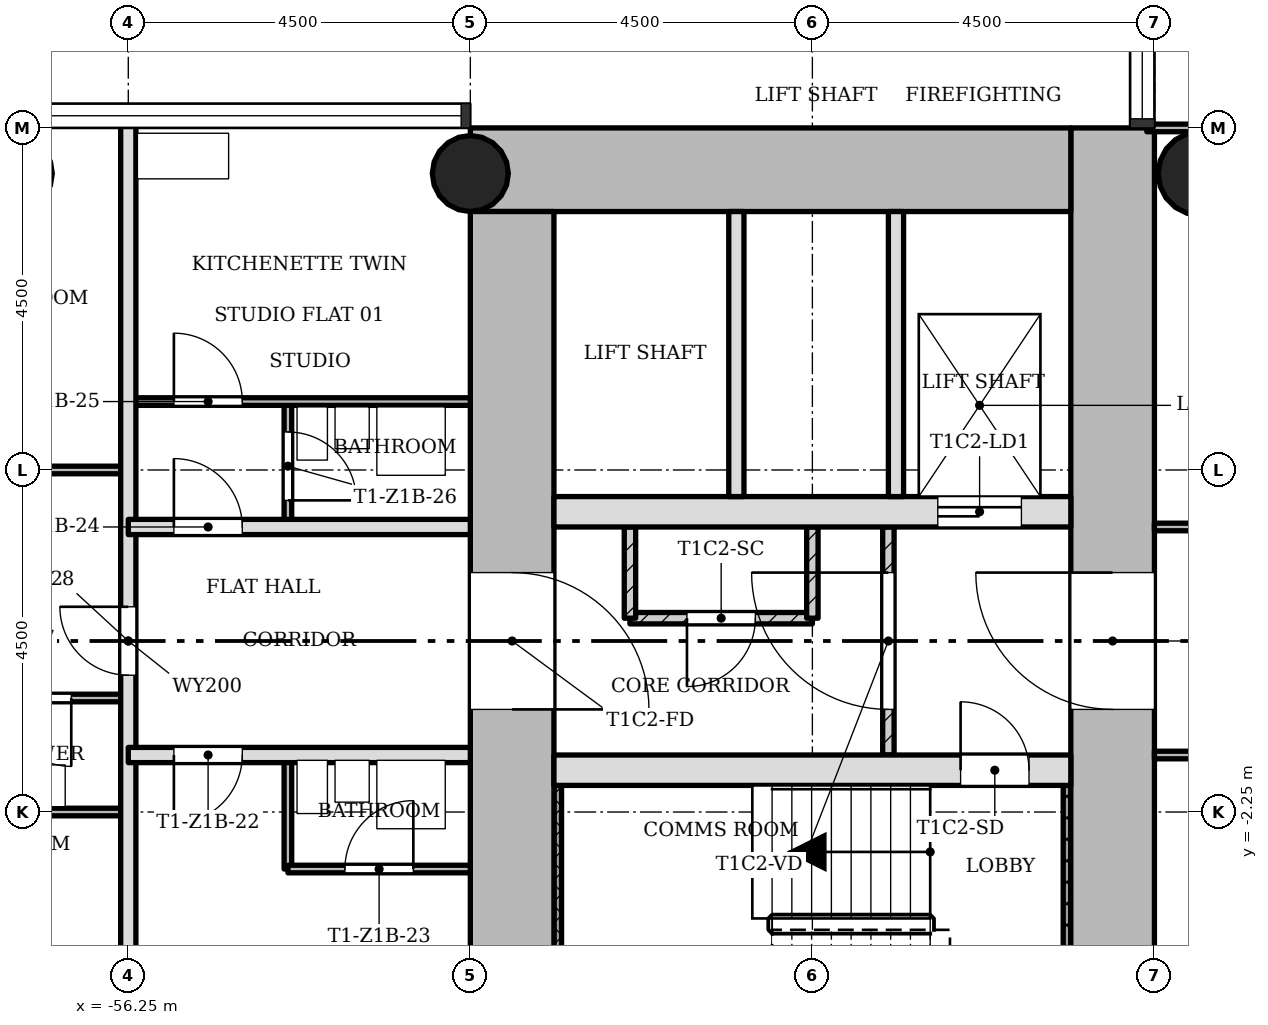
"""IFC4 building model, lengths in metres.
Left out: names, types, materials, properties, quantities, classifications, styles, units other than length and angle.
Written with IfcOpenShell. Run it as: python <this file> out.ifc"""

import sys

from ifc_helpers import new_model, si_unit, direction, frame, frame_2d, origin, origin_2d, place, context, subcontext, project, spatial, rectangle, hollow_circle, extrude, element, fill, save


model = new_model("IFC4")
c1 = context("Model", 3, precision=1e-05, world=origin(), true_north=direction((0.0, 1.0)))
c2 = subcontext(c1, "Body", "Model", "MODEL_VIEW")
j1 = project(units=[si_unit("LENGTHUNIT", "METRE"), si_unit("PLANEANGLEUNIT", "RADIAN")], contexts=[c1])
p1 = place(None, origin())
s1 = spatial("IfcSite", under=j1, at=p1, CompositionType="ELEMENT")
p2 = place(p1, origin())
s2 = spatial("IfcBuilding", under=s1, at=p2, CompositionType="ELEMENT")
p3 = place(p2, frame((0.0, 0.0, 41.5)))
s3 = spatial("IfcBuildingStorey", under=s2, at=p3, CompositionType="ELEMENT", Elevation=41.5)
p4 = place(p3, frame((-43.3, -5.65, 0.0), z_axis=(0.0, 0.0, 1.0), x_axis=(0.0, 1.0, 0.0)))
e1 = element("IfcWall", 1, at=p4, inside=s3, PredefinedType="SHEAR", context=c2, shape_type="SweptSolid", body=[
    extrude(rectangle(XDim=12.4, YDim=1.1, at=frame_2d((6.2, 0.0))), origin(), (0.0, 0.0, 1.0), 3.4),
])
p5 = place(p4, frame((4.75, 0.0, 0.0)))
e2 = element("IfcOpeningElement", 2, at=p5, cuts=e1, PredefinedType="OPENING", context=c2, shape_type="SweptSolid", body=[
    extrude(rectangle(XDim=1.8, YDim=2.1, at=frame_2d((0.9, 1.05))), frame((0.0, 0.56, 0.0), z_axis=(0.0, -1.0, 0.0), x_axis=(1.0, 0.0, 0.0)), (0.0, 0.0, 1.0), 1.12),
])
p6 = place(p3, frame((-43.85, 6.2, 0.0), z_axis=(0.0, 0.0, 1.0), x_axis=(-1.0, 0.0, 0.0)))
e3 = element("IfcWall", 3, at=p6, inside=s3, PredefinedType="SHEAR", context=c2, shape_type="SweptSolid", body=[
    extrude(rectangle(XDim=7.9, YDim=1.1, at=frame_2d((3.95, 0.0))), origin(), (0.0, 0.0, 1.0), 3.4),
])
p7 = place(p3, frame((-51.2, 5.65, 0.0), z_axis=(0.0, 0.0, 1.0), x_axis=(0.0, -1.0, 0.0)))
e4 = element("IfcWall", 4, at=p7, inside=s3, PredefinedType="SHEAR", context=c2, shape_type="SweptSolid", body=[
    extrude(rectangle(XDim=12.4, YDim=1.1, at=frame_2d((6.2, 0.0))), origin(), (0.0, 0.0, 1.0), 3.4),
])
p8 = place(p7, frame((4.75, 0.0, 0.0)))
e5 = element("IfcOpeningElement", 5, at=p8, cuts=e4, PredefinedType="OPENING", context=c2, shape_type="SweptSolid", body=[
    extrude(rectangle(XDim=1.8, YDim=2.1, at=frame_2d((0.9, 1.05))), frame((0.0, 0.56, 0.0), z_axis=(0.0, -1.0, 0.0), x_axis=(1.0, 0.0, 0.0)), (0.0, 0.0, 1.0), 1.12),
])
p9 = place(p3, frame((-50.65, -1.7, 0.0), z_axis=(0.0, 0.0, 1.0), x_axis=(1.0, 0.0, 0.0)))
e6 = element("IfcWall", 6, at=p9, inside=s3, PredefinedType="SHEAR", context=c2, shape_type="SweptSolid", body=[
    extrude(rectangle(XDim=6.8, YDim=0.4, at=frame_2d((3.4, 0.0))), origin(), (0.0, 0.0, 1.0), 3.4),
])
p10 = place(p9, frame((5.35, 0.0, 0.0)))
e7 = element("IfcOpeningElement", 7, at=p10, cuts=e6, PredefinedType="OPENING", context=c2, shape_type="SweptSolid", body=[
    extrude(rectangle(XDim=0.9, YDim=2.1, at=frame_2d((0.45, 1.05))), frame((0.0, 0.21, 0.0), z_axis=(0.0, -1.0, 0.0), x_axis=(1.0, 0.0, 0.0)), (0.0, 0.0, 1.0), 0.42),
])
p11 = place(p3, frame((-50.65, 1.7, 0.0), z_axis=(0.0, 0.0, 1.0), x_axis=(1.0, 0.0, 0.0)))
e8 = element("IfcWall", 8, at=p11, inside=s3, PredefinedType="SHEAR", context=c2, shape_type="SweptSolid", body=[
    extrude(rectangle(XDim=6.8, YDim=0.4, at=frame_2d((3.4, 0.0))), origin(), (0.0, 0.0, 1.0), 3.4),
])
p12 = place(p11, frame((5.05, 0.0, 0.0)))
e9 = element("IfcOpeningElement", 9, at=p12, cuts=e8, PredefinedType="OPENING", context=c2, shape_type="SweptSolid", body=[
    extrude(rectangle(XDim=1.1, YDim=2.1, at=frame_2d((0.55, 1.05))), frame((0.0, 0.21, 0.0), z_axis=(0.0, -1.0, 0.0), x_axis=(1.0, 0.0, 0.0)), (0.0, 0.0, 1.0), 0.42),
])
p13 = place(p3, frame((-51.75, 6.15, 0.0), z_axis=(0.0, 0.0, 1.0), x_axis=(1.0, 0.0, 0.0)))
e10 = element("IfcColumn", 10, at=p13, inside=s3, PredefinedType="COLUMN", context=c2, shape_type="SweptSolid", body=[
    extrude(hollow_circle(Radius=0.5, WallThickness=0.036, at=origin_2d()), origin(), (0.0, 0.0, 1.0), 3.4),
])
p14 = place(p3, frame((-42.15, 6.15, 0.0), z_axis=(0.0, 0.0, 1.0), x_axis=(1.0, 0.0, 0.0)))
e11 = element("IfcColumn", 11, at=p14, inside=s3, PredefinedType="COLUMN", context=c2, shape_type="SweptSolid", body=[
    extrude(hollow_circle(Radius=0.55, WallThickness=0.04, at=origin_2d()), origin(), (0.0, 0.0, 1.0), 3.4),
])
p15 = place(p3, frame((-46.25, 1.5, 0.0), z_axis=(0.0, 0.0, 1.0), x_axis=(0.0, -1.0, 0.0)))
e12 = element("IfcWall", 12, at=p15, inside=s3, PredefinedType="PARTITIONING", context=c2, shape_type="SweptSolid", body=[
    extrude(rectangle(XDim=3.0, YDim=0.15, at=frame_2d((1.5, 0.0))), origin(), (0.0, 0.0, 1.0), 3.0),
])
p16 = place(p15, frame((0.6, 0.0, 0.0)))
e13 = element("IfcOpeningElement", 13, at=p16, cuts=e12, PredefinedType="OPENING", context=c2, shape_type="SweptSolid", body=[
    extrude(rectangle(XDim=1.8, YDim=2.1, at=frame_2d((0.9, 1.05))), frame((0.0, 0.085, 0.0), z_axis=(0.0, -1.0, 0.0), x_axis=(1.0, 0.0, 0.0)), (0.0, 0.0, 1.0), 0.17),
])
for number, where, z_axis, x_axis in (
    (14, (-46.15, 5.65, 0.0), (0.0, 0.0, 1.0), (0.0, -1.0, 0.0)),
    (15, (-48.25, 5.65, 0.0), (0.0, 0.0, 1.0), (0.0, -1.0, 0.0)),
):
    element("IfcWall", number, at=place(p3, frame(where, z_axis=z_axis, x_axis=x_axis)), inside=s3, PredefinedType="SOLIDWALL", context=c2, shape_type="SweptSolid", body=[
        extrude(rectangle(XDim=3.75, YDim=0.2, at=frame_2d((1.875, 0.0))), origin(), (0.0, 0.0, 1.0), 3.0),
    ])
p17 = place(p3, frame((-47.25, 0.3, 0.0), z_axis=(0.0, 0.0, 1.0), x_axis=(-1.0, 0.0, 0.0)))
e16 = element("IfcWall", 16, at=p17, inside=s3, PredefinedType="PARTITIONING", context=c2, shape_type="SweptSolid", body=[
    extrude(rectangle(XDim=2.4, YDim=0.15, at=frame_2d((1.2, 0.0))), origin(), (0.0, 0.0, 1.0), 3.0),
])
p18 = place(p17, frame((0.75, 0.0, 0.0)))
e17 = element("IfcOpeningElement", 17, at=p18, cuts=e16, PredefinedType="OPENING", context=c2, shape_type="SweptSolid", body=[
    extrude(rectangle(XDim=0.9, YDim=2.1, at=frame_2d((0.45, 1.05))), frame((0.0, 0.085, 0.0), z_axis=(0.0, -1.0, 0.0), x_axis=(1.0, 0.0, 0.0)), (0.0, 0.0, 1.0), 0.17),
])
for number, where, z_axis, x_axis in (
    (18, (-47.25, 0.3, 0.0), (0.0, 0.0, 1.0), (0.0, 1.0, 0.0)),
    (19, (-49.65, 0.3, 0.0), (0.0, 0.0, 1.0), (0.0, 1.0, 0.0)),
):
    element("IfcWall", number, at=place(p3, frame(where, z_axis=z_axis, x_axis=x_axis)), inside=s3, PredefinedType="PARTITIONING", context=c2, shape_type="SweptSolid", body=[
        extrude(rectangle(XDim=1.2, YDim=0.15, at=frame_2d((0.6, 0.0))), origin(), (0.0, 0.0, 1.0), 3.0),
    ])
p19 = place(p3, frame((-56.25, -6.85, 0.0), z_axis=(0.0, 0.0, 1.0), x_axis=(0.0, 1.0, 0.0)))
e20 = element("IfcWall", 20, at=p19, inside=s3, PredefinedType="SOLIDWALL", context=c2, shape_type="SweptSolid", body=[
    extrude(rectangle(XDim=13.7, YDim=0.2, at=frame_2d((6.85, 0.0))), origin(), (0.0, 0.0, 1.0), 3.0),
])
p20 = place(p19, frame((6.4, 0.0, 0.0)))
e21 = element("IfcOpeningElement", 21, at=p20, cuts=e20, PredefinedType="OPENING", context=c2, shape_type="SweptSolid", body=[
    extrude(rectangle(XDim=0.9, YDim=2.1, at=frame_2d((0.45, 1.05))), frame((0.0, 0.11, 0.0), z_axis=(0.0, -1.0, 0.0), x_axis=(1.0, 0.0, 0.0)), (0.0, 0.0, 1.0), 0.22),
])
p21 = place(p3, frame((-54.15, -3.0, 0.0), z_axis=(0.0, 0.0, 1.0), x_axis=(0.0, 1.0, 0.0)))
e22 = element("IfcWall", 22, at=p21, inside=s3, PredefinedType="PARTITIONING", context=c2, shape_type="SweptSolid", body=[
    extrude(rectangle(XDim=1.5, YDim=0.1, at=frame_2d((0.75, 0.0))), origin(), (0.0, 0.0, 1.0), 3.0),
])
p22 = place(p3, frame((-54.15, 1.5, 0.0), z_axis=(0.0, 0.0, 1.0), x_axis=(0.0, 1.0, 0.0)))
e23 = element("IfcWall", 23, at=p22, inside=s3, PredefinedType="PARTITIONING", context=c2, shape_type="SweptSolid", body=[
    extrude(rectangle(XDim=1.65, YDim=0.1, at=frame_2d((0.825, 0.0))), origin(), (0.0, 0.0, 1.0), 3.0),
])
p23 = place(p22, frame((0.35, 0.0, 0.0)))
e24 = element("IfcOpeningElement", 24, at=p23, cuts=e23, PredefinedType="OPENING", context=c2, shape_type="SweptSolid", body=[
    extrude(rectangle(XDim=0.9, YDim=2.1, at=frame_2d((0.45, 1.05))), frame((0.0, 0.06, 0.0), z_axis=(0.0, -1.0, 0.0), x_axis=(1.0, 0.0, 0.0)), (0.0, 0.0, 1.0), 0.12),
])
p24 = place(p3, frame((-54.15, -3.0, 0.0), z_axis=(0.0, 0.0, 1.0), x_axis=(1.0, 0.0, 0.0)))
e25 = element("IfcWall", 25, at=p24, inside=s3, PredefinedType="PARTITIONING", context=c2, shape_type="SweptSolid", body=[
    extrude(rectangle(XDim=2.4, YDim=0.1, at=frame_2d((1.2, 0.0))), origin(), (0.0, 0.0, 1.0), 3.0),
])
p25 = place(p24, frame((0.75, 0.0, 0.0)))
e26 = element("IfcOpeningElement", 26, at=p25, cuts=e25, PredefinedType="OPENING", context=c2, shape_type="SweptSolid", body=[
    extrude(rectangle(XDim=0.9, YDim=2.1, at=frame_2d((0.45, 1.05))), frame((0.0, 0.06, 0.0), z_axis=(0.0, -1.0, 0.0), x_axis=(1.0, 0.0, 0.0)), (0.0, 0.0, 1.0), 0.12),
])
p26 = place(p3, frame((-60.85, -2.25, 0.0), z_axis=(0.0, 0.0, 1.0), x_axis=(1.0, 0.0, 0.0)))
e27 = element("IfcWall", 27, at=p26, inside=s3, PredefinedType="PARTITIONING", context=c2, shape_type="SweptSolid", body=[
    extrude(rectangle(XDim=4.6, YDim=0.1, at=frame_2d((2.3, 0.0))), origin(), (0.0, 0.0, 1.0), 3.0),
])
p27 = place(p26, frame((1.25, 0.0, 0.0)))
e28 = element("IfcOpeningElement", 28, at=p27, cuts=e27, PredefinedType="OPENING", context=c2, shape_type="SweptSolid", body=[
    extrude(rectangle(XDim=0.9, YDim=2.1, at=frame_2d((0.45, 1.05))), frame((0.0, 0.06, 0.0), z_axis=(0.0, -1.0, 0.0), x_axis=(1.0, 0.0, 0.0)), (0.0, 0.0, 1.0), 0.12),
])
p28 = place(p3, frame((-42.75, -1.5, 0.0), z_axis=(0.0, 0.0, 1.0), x_axis=(1.0, 0.0, 0.0)))
e29 = element("IfcWall", 29, at=p28, inside=s3, PredefinedType="PARTITIONING", context=c2, shape_type="SweptSolid", body=[
    extrude(rectangle(XDim=5.85, YDim=0.1, at=frame_2d((2.925, 0.0))), origin(), (0.0, 0.0, 1.0), 3.0),
])
p29 = place(p28, frame((2.475, 0.0, 0.0)))
e30 = element("IfcOpeningElement", 30, at=p29, cuts=e29, PredefinedType="OPENING", context=c2, shape_type="SweptSolid", body=[
    extrude(rectangle(XDim=0.9, YDim=2.1, at=frame_2d((0.45, 1.05))), frame((0.0, 0.06, 0.0), z_axis=(0.0, -1.0, 0.0), x_axis=(1.0, 0.0, 0.0)), (0.0, 0.0, 1.0), 0.12),
])
p30 = place(p3, frame((-56.25, -1.5, 0.0), z_axis=(0.0, 0.0, 1.0), x_axis=(1.0, 0.0, 0.0)))
e31 = element("IfcWall", 31, at=p30, inside=s3, PredefinedType="SOLIDWALL", context=c2, shape_type="SweptSolid", body=[
    extrude(rectangle(XDim=4.5, YDim=0.2, at=frame_2d((2.25, 0.0))), origin(), (0.0, 0.0, 1.0), 3.0),
])
p31 = place(p30, frame((0.6, 0.0, 0.0)))
e32 = element("IfcOpeningElement", 32, at=p31, cuts=e31, PredefinedType="OPENING", context=c2, shape_type="SweptSolid", body=[
    extrude(rectangle(XDim=0.9, YDim=2.1, at=frame_2d((0.45, 1.05))), frame((0.0, 0.11, 0.0), z_axis=(0.0, -1.0, 0.0), x_axis=(1.0, 0.0, 0.0)), (0.0, 0.0, 1.0), 0.22),
])
p32 = place(p3, frame((-58.65, -0.75, 0.0), z_axis=(0.0, 0.0, 1.0), x_axis=(1.0, 0.0, 0.0)))
e33 = element("IfcWall", 33, at=p32, inside=s3, PredefinedType="PARTITIONING", context=c2, shape_type="SweptSolid", body=[
    extrude(rectangle(XDim=2.4, YDim=0.1, at=frame_2d((1.2, 0.0))), origin(), (0.0, 0.0, 1.0), 3.0),
])
p33 = place(p32, frame((0.75, 0.0, 0.0)))
e34 = element("IfcOpeningElement", 34, at=p33, cuts=e33, PredefinedType="OPENING", context=c2, shape_type="SweptSolid", body=[
    extrude(rectangle(XDim=0.9, YDim=2.1, at=frame_2d((0.45, 1.05))), frame((0.0, 0.06, 0.0), z_axis=(0.0, -1.0, 0.0), x_axis=(1.0, 0.0, 0.0)), (0.0, 0.0, 1.0), 0.12),
])
p34 = place(p3, frame((-42.75, 1.5, 0.0), z_axis=(0.0, 0.0, 1.0), x_axis=(1.0, 0.0, 0.0)))
e35 = element("IfcWall", 35, at=p34, inside=s3, PredefinedType="PARTITIONING", context=c2, shape_type="SweptSolid", body=[
    extrude(rectangle(XDim=5.85, YDim=0.1, at=frame_2d((2.925, 0.0))), origin(), (0.0, 0.0, 1.0), 3.0),
])
p35 = place(p34, frame((2.475, 0.0, 0.0)))
e36 = element("IfcOpeningElement", 36, at=p35, cuts=e35, PredefinedType="OPENING", context=c2, shape_type="SweptSolid", body=[
    extrude(rectangle(XDim=0.9, YDim=2.1, at=frame_2d((0.45, 1.05))), frame((0.0, 0.06, 0.0), z_axis=(0.0, -1.0, 0.0), x_axis=(1.0, 0.0, 0.0)), (0.0, 0.0, 1.0), 0.12),
])
p36 = place(p3, frame((-56.25, 1.5, 0.0), z_axis=(0.0, 0.0, 1.0), x_axis=(1.0, 0.0, 0.0)))
e37 = element("IfcWall", 37, at=p36, inside=s3, PredefinedType="SOLIDWALL", context=c2, shape_type="SweptSolid", body=[
    extrude(rectangle(XDim=4.5, YDim=0.2, at=frame_2d((2.25, 0.0))), origin(), (0.0, 0.0, 1.0), 3.0),
])
p37 = place(p36, frame((0.6, 0.0, 0.0)))
e38 = element("IfcOpeningElement", 38, at=p37, cuts=e37, PredefinedType="OPENING", context=c2, shape_type="SweptSolid", body=[
    extrude(rectangle(XDim=0.9, YDim=2.1, at=frame_2d((0.45, 1.05))), frame((0.0, 0.11, 0.0), z_axis=(0.0, -1.0, 0.0), x_axis=(1.0, 0.0, 0.0)), (0.0, 0.0, 1.0), 0.22),
])
p38 = place(p3, frame((-60.85, 2.25, 0.0), z_axis=(0.0, 0.0, 1.0), x_axis=(1.0, 0.0, 0.0)))
e39 = element("IfcWall", 39, at=p38, inside=s3, PredefinedType="PARTITIONING", context=c2, shape_type="SweptSolid", body=[
    extrude(rectangle(XDim=4.6, YDim=0.1, at=frame_2d((2.3, 0.0))), origin(), (0.0, 0.0, 1.0), 3.0),
])
p39 = place(p38, frame((1.9, 0.0, 0.0)))
e40 = element("IfcOpeningElement", 40, at=p39, cuts=e39, PredefinedType="OPENING", context=c2, shape_type="SweptSolid", body=[
    extrude(rectangle(XDim=0.9, YDim=2.1, at=frame_2d((0.45, 1.05))), frame((0.0, 0.06, 0.0), z_axis=(0.0, -1.0, 0.0), x_axis=(1.0, 0.0, 0.0)), (0.0, 0.0, 1.0), 0.12),
])
p40 = place(p3, frame((-56.25, 3.15, 0.0), z_axis=(0.0, 0.0, 1.0), x_axis=(1.0, 0.0, 0.0)))
e41 = element("IfcWall", 41, at=p40, inside=s3, PredefinedType="PARTITIONING", context=c2, shape_type="SweptSolid", body=[
    extrude(rectangle(XDim=4.5, YDim=0.1, at=frame_2d((2.25, 0.0))), origin(), (0.0, 0.0, 1.0), 3.0),
])
p41 = place(p40, frame((0.6, 0.0, 0.0)))
e42 = element("IfcOpeningElement", 42, at=p41, cuts=e41, PredefinedType="OPENING", context=c2, shape_type="SweptSolid", body=[
    extrude(rectangle(XDim=0.9, YDim=2.1, at=frame_2d((0.45, 1.05))), frame((0.0, 0.06, 0.0), z_axis=(0.0, -1.0, 0.0), x_axis=(1.0, 0.0, 0.0)), (0.0, 0.0, 1.0), 0.12),
])
p42 = place(p3, frame((-42.85, 6.75, 0.0), z_axis=(0.0, 0.0, 1.0), x_axis=(1.0, 0.0, 0.0)))
e43 = element("IfcWall", 43, at=p42, inside=s3, PredefinedType="PARTITIONING", context=c2, shape_type="SweptSolid", body=[
    extrude(rectangle(XDim=5.95, YDim=0.1, at=frame_2d((2.975, 0.0))), origin(), (0.0, 0.0, 1.0), 3.0),
])
for number, where, z_axis, x_axis in (
    (44, (-50.6, -1.9, 0.0), (0.0, 0.0, 1.0), (0.0, -1.0, 0.0)),
    (45, (-43.9, -1.9, 0.0), (0.0, 0.0, 1.0), (0.0, -1.0, 0.0)),
):
    element("IfcWall", number, at=place(p3, frame(where, z_axis=z_axis, x_axis=x_axis)), inside=s3, PredefinedType="SHEAR", context=c2, shape_type="SweptSolid", body=[
        extrude(rectangle(XDim=3.75, YDim=0.1, at=frame_2d((1.875, 0.0))), origin(), (0.0, 0.0, 1.0), 3.4),
    ])
p43 = place(p16, origin())
e46 = element("IfcDoor", 46, at=p43, inside=s3, OperationType="SINGLE_SWING_LEFT", PredefinedType="DOOR", context=c2, shape_type="SweptSolid", body=[
    extrude(rectangle(XDim=1.8, YDim=2.1, at=frame_2d((0.9, 1.05))), frame((0.0, 0.025, 0.0), z_axis=(0.0, -1.0, 0.0), x_axis=(1.0, 0.0, 0.0)), (0.0, 0.0, 1.0), 0.05),
])
fill(e13, e46)
p44 = place(p18, origin())
e47 = element("IfcDoor", 47, at=p44, inside=s3, OperationType="SINGLE_SWING_LEFT", PredefinedType="DOOR", context=c2, shape_type="SweptSolid", body=[
    extrude(rectangle(XDim=0.9, YDim=2.1, at=frame_2d((0.45, 1.05))), frame((0.0, 0.025, 0.0), z_axis=(0.0, -1.0, 0.0), x_axis=(1.0, 0.0, 0.0)), (0.0, 0.0, 1.0), 0.05),
])
fill(e17, e47)
p45 = place(p31, origin())
e48 = element("IfcDoor", 48, at=p45, inside=s3, OperationType="SINGLE_SWING_LEFT", PredefinedType="DOOR", context=c2, shape_type="SweptSolid", body=[
    extrude(rectangle(XDim=0.9, YDim=2.1, at=frame_2d((0.45, 1.05))), frame((0.0, 0.025, 0.0), z_axis=(0.0, -1.0, 0.0), x_axis=(1.0, 0.0, 0.0)), (0.0, 0.0, 1.0), 0.05),
])
fill(e32, e48)
p46 = place(p25, origin())
e49 = element("IfcDoor", 49, at=p46, inside=s3, OperationType="SINGLE_SWING_LEFT", PredefinedType="DOOR", context=c2, shape_type="SweptSolid", body=[
    extrude(rectangle(XDim=0.9, YDim=2.1, at=frame_2d((0.45, 1.05))), frame((0.0, 0.025, 0.0), z_axis=(0.0, -1.0, 0.0), x_axis=(1.0, 0.0, 0.0)), (0.0, 0.0, 1.0), 0.05),
])
fill(e26, e49)
p47 = place(p37, origin())
e50 = element("IfcDoor", 50, at=p47, inside=s3, OperationType="SINGLE_SWING_RIGHT", PredefinedType="DOOR", context=c2, shape_type="SweptSolid", body=[
    extrude(rectangle(XDim=0.9, YDim=2.1, at=frame_2d((0.45, 1.05))), frame((0.0, 0.025, 0.0), z_axis=(0.0, -1.0, 0.0), x_axis=(1.0, 0.0, 0.0)), (0.0, 0.0, 1.0), 0.05),
])
fill(e38, e50)
p48 = place(p41, origin())
e51 = element("IfcDoor", 51, at=p48, inside=s3, OperationType="SINGLE_SWING_RIGHT", PredefinedType="DOOR", context=c2, shape_type="SweptSolid", body=[
    extrude(rectangle(XDim=0.9, YDim=2.1, at=frame_2d((0.45, 1.05))), frame((0.0, 0.025, 0.0), z_axis=(0.0, -1.0, 0.0), x_axis=(1.0, 0.0, 0.0)), (0.0, 0.0, 1.0), 0.05),
])
fill(e42, e51)
p49 = place(p23, origin())
e52 = element("IfcDoor", 52, at=p49, inside=s3, OperationType="SINGLE_SWING_LEFT", PredefinedType="DOOR", context=c2, shape_type="SweptSolid", body=[
    extrude(rectangle(XDim=0.9, YDim=2.1, at=frame_2d((0.45, 1.05))), frame((0.0, 0.025, 0.0), z_axis=(0.0, -1.0, 0.0), x_axis=(1.0, 0.0, 0.0)), (0.0, 0.0, 1.0), 0.05),
])
fill(e24, e52)
p50 = place(p33, origin())
e53 = element("IfcDoor", 53, at=p50, inside=s3, OperationType="SINGLE_SWING_RIGHT", PredefinedType="DOOR", context=c2, shape_type="SweptSolid", body=[
    extrude(rectangle(XDim=0.9, YDim=2.1, at=frame_2d((0.45, 1.05))), frame((0.0, 0.025, 0.0), z_axis=(0.0, -1.0, 0.0), x_axis=(1.0, 0.0, 0.0)), (0.0, 0.0, 1.0), 0.05),
])
fill(e34, e53)
p51 = place(p20, origin())
e54 = element("IfcDoor", 54, at=p51, inside=s3, OperationType="SINGLE_SWING_LEFT", PredefinedType="DOOR", context=c2, shape_type="SweptSolid", body=[
    extrude(rectangle(XDim=0.9, YDim=2.1, at=frame_2d((0.45, 1.05))), frame((0.0, 0.025, 0.0), z_axis=(0.0, -1.0, 0.0), x_axis=(1.0, 0.0, 0.0)), (0.0, 0.0, 1.0), 0.05),
])
fill(e21, e54)
p52 = place(p10, origin())
e55 = element("IfcDoor", 55, at=p52, inside=s3, OperationType="SINGLE_SWING_RIGHT", PredefinedType="DOOR", context=c2, shape_type="SweptSolid", body=[
    extrude(rectangle(XDim=0.9, YDim=2.1, at=frame_2d((0.45, 1.05))), frame((0.0, 0.025, 0.0), z_axis=(0.0, -1.0, 0.0), x_axis=(1.0, 0.0, 0.0)), (0.0, 0.0, 1.0), 0.05),
])
fill(e7, e55)
p53 = place(p12, origin())
e56 = element("IfcDoor", 56, at=p53, inside=s3, OperationType="SLIDING_TO_LEFT", PredefinedType="DOOR", context=c2, shape_type="SweptSolid", body=[
    extrude(rectangle(XDim=1.1, YDim=2.1, at=frame_2d((0.55, 1.05))), frame((0.0, 0.025, 0.0), z_axis=(0.0, -1.0, 0.0), x_axis=(1.0, 0.0, 0.0)), (0.0, 0.0, 1.0), 0.05),
])
fill(e9, e56)
p54 = place(p5, origin())
e57 = element("IfcDoor", 57, at=p54, inside=s3, OperationType="SINGLE_SWING_LEFT", PredefinedType="DOOR", context=c2, shape_type="SweptSolid", body=[
    extrude(rectangle(XDim=1.8, YDim=2.1, at=frame_2d((0.9, 1.05))), frame((0.0, 0.025, 0.0), z_axis=(0.0, -1.0, 0.0), x_axis=(1.0, 0.0, 0.0)), (0.0, 0.0, 1.0), 0.05),
])
fill(e2, e57)
p55 = place(p8, origin())
e58 = element("IfcDoor", 58, at=p55, inside=s3, OperationType="SINGLE_SWING_LEFT", PredefinedType="DOOR", context=c2, shape_type="SweptSolid", body=[
    extrude(rectangle(XDim=1.8, YDim=2.1, at=frame_2d((0.9, 1.05))), frame((0.0, 0.025, 0.0), z_axis=(0.0, -1.0, 0.0), x_axis=(1.0, 0.0, 0.0)), (0.0, 0.0, 1.0), 0.05),
])
fill(e5, e58)
save(model, sys.argv[1])
